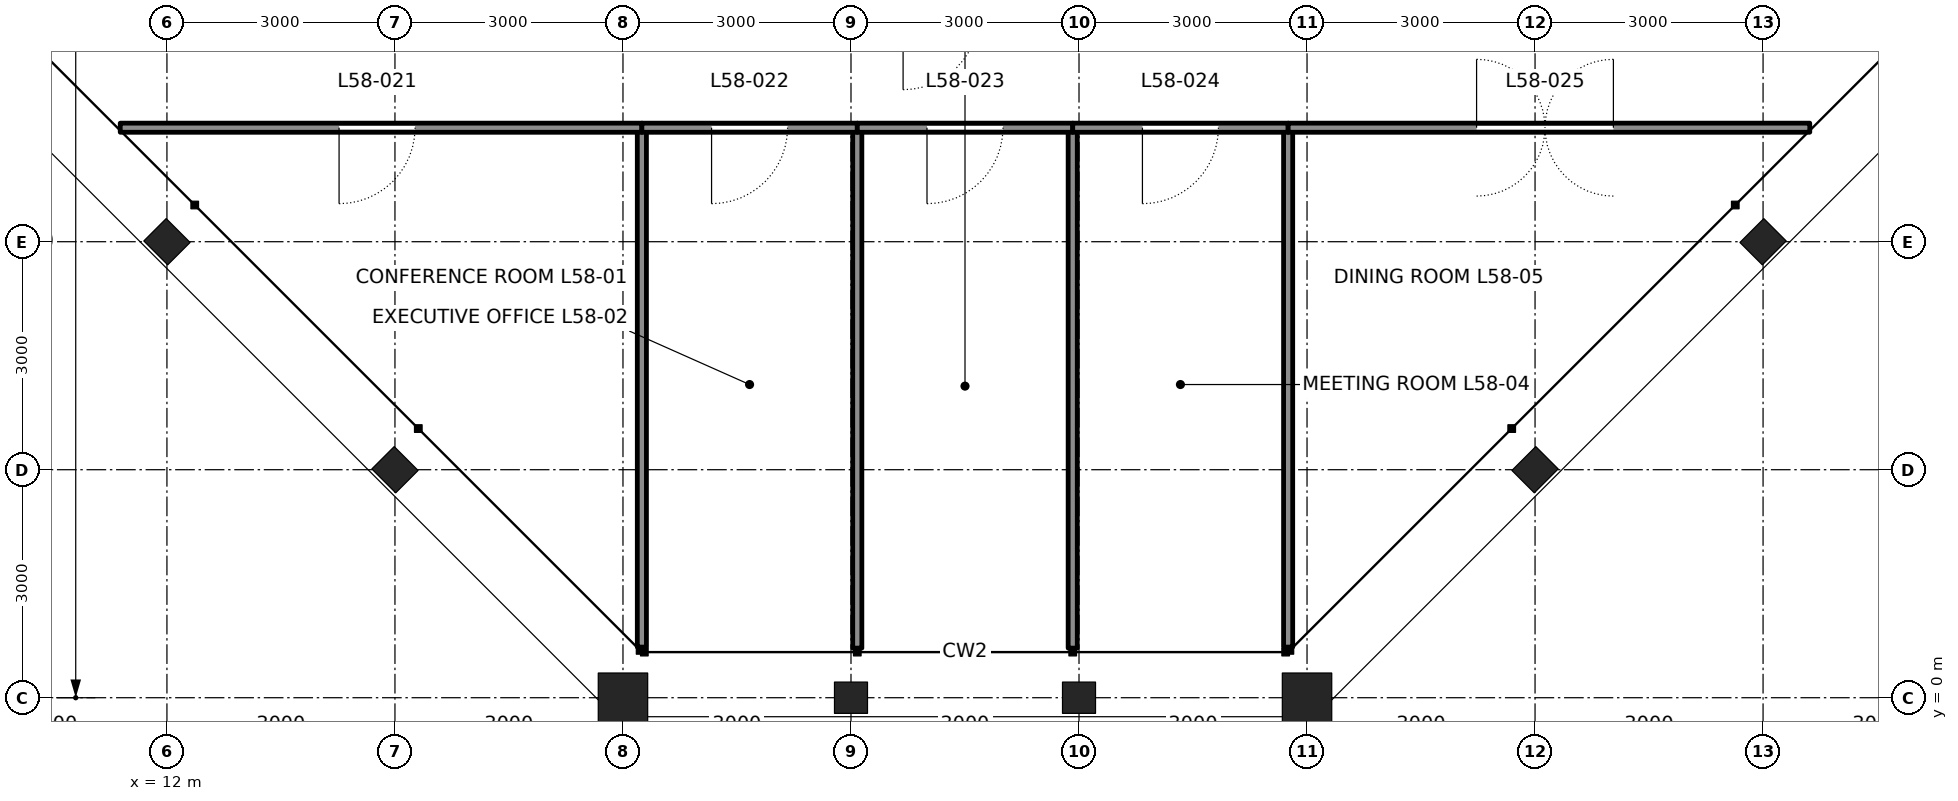
"""IFC4 building model, lengths in metres.
Left out: names, types, materials, properties, quantities, classifications, styles, units other than length and angle.
Written with IfcOpenShell. Run it as: python <this file> out.ifc"""

import sys

from ifc_helpers import new_model, si_unit, direction, frame, frame_2d, origin, origin_2d, place, context, subcontext, project, spatial, rectangle, hollow_rectangle, i_section, extrude, element, fill, save


model = new_model("IFC4")
c1 = context("Model", 3, precision=1e-05, world=origin(), true_north=direction((0.0, 1.0)))
c2 = subcontext(c1, "Body", "Model", "MODEL_VIEW")
j1 = project(units=[si_unit("LENGTHUNIT", "METRE"), si_unit("PLANEANGLEUNIT", "RADIAN")], contexts=[c1])
p1 = place(None, origin())
s1 = spatial("IfcSite", under=j1, at=p1, CompositionType="ELEMENT")
p2 = place(p1, origin())
s2 = spatial("IfcBuilding", under=s1, at=p2, CompositionType="ELEMENT")
p3 = place(p2, frame((0.0, 0.0, 262.2)))
s3 = spatial("IfcBuildingStorey", under=s2, at=p3, CompositionType="ELEMENT", Elevation=262.2)
p4 = place(p3, frame((18.0, 0.0, 0.0), z_axis=(0.0, 0.0, 1.0), x_axis=(0.0, -1.0, 0.0)))
e1 = element("IfcColumn", 1, at=p4, inside=s3, PredefinedType="COLUMN", context=c2, shape_type="SweptSolid", body=[
    extrude(hollow_rectangle(XDim=0.65, YDim=0.65, WallThickness=0.065, at=origin_2d()), origin(), (0.0, 0.0, 1.0), 4.2),
])
for number, where, z_axis, x_axis in (
    (2, (21.0, 0.0, 0.0), (0.0, 0.0, 1.0), (0.0, -1.0, 0.0)),
    (3, (24.0, 0.0, 0.0), (0.0, 0.0, 1.0), (0.0, -1.0, 0.0)),
):
    element("IfcColumn", number, at=place(p3, frame(where, z_axis=z_axis, x_axis=x_axis)), inside=s3, PredefinedType="COLUMN", context=c2, shape_type="SweptSolid", body=[
        extrude(i_section(OverallWidth=0.411, OverallDepth=0.434, WebThickness=0.036, FlangeThickness=0.057, at=origin_2d()), origin(), (0.0, 0.0, 1.0), 4.2),
    ])
p5 = place(p3, frame((27.0, 0.0, 0.0), z_axis=(0.0, 0.0, 1.0), x_axis=(0.0, -1.0, 0.0)))
e4 = element("IfcColumn", 4, at=p5, inside=s3, PredefinedType="COLUMN", context=c2, shape_type="SweptSolid", body=[
    extrude(hollow_rectangle(XDim=0.65, YDim=0.65, WallThickness=0.065, at=origin_2d()), origin(), (0.0, 0.0, 1.0), 4.2),
])
for number, where, z_axis, x_axis in (
    (5, (30.0, 3.0, 0.0), (0.0, 0.0, 1.0), (0.707, -0.707, 0.0)),
    (6, (33.0, 6.0, 0.0), (0.0, 0.0, 1.0), (0.707, -0.707, 0.0)),
    (7, (12.0, 6.0, 0.0), (0.0, 0.0, 1.0), (-0.707, -0.707, 0.0)),
    (8, (15.0, 3.0, 0.0), (0.0, 0.0, 1.0), (-0.707, -0.707, 0.0)),
):
    element("IfcColumn", number, at=place(p3, frame(where, z_axis=z_axis, x_axis=x_axis)), inside=s3, PredefinedType="COLUMN", context=c2, shape_type="SweptSolid", body=[
        extrude(i_section(OverallWidth=0.417, OverallDepth=0.445, WebThickness=0.039, FlangeThickness=0.063, at=origin_2d()), origin(), (0.0, 0.0, 1.0), 4.2),
    ])
p6 = place(p3, frame((18.249, 0.666, 0.0), z_axis=(0.0, 0.0, 1.0), x_axis=(0.0, 1.0, 0.0)))
e9 = element("IfcWall", 9, at=p6, inside=s3, PredefinedType="PARTITIONING", context=c2, shape_type="SweptSolid", body=[
    extrude(rectangle(XDim=6.834, YDim=0.12, at=frame_2d((3.417, 0.0))), origin(), (0.0, 0.0, 1.0), 4.04),
])
for number, where, z_axis, x_axis in (
    (10, (21.083, 0.653, 0.0), (0.0, 0.0, 1.0), (0.0, 1.0, 0.0)),
    (11, (23.917, 0.653, 0.0), (0.0, 0.0, 1.0), (0.0, 1.0, 0.0)),
):
    element("IfcWall", number, at=place(p3, frame(where, z_axis=z_axis, x_axis=x_axis)), inside=s3, PredefinedType="PARTITIONING", context=c2, shape_type="SweptSolid", body=[
        extrude(rectangle(XDim=6.847, YDim=0.12, at=frame_2d((3.424, 0.0))), origin(), (0.0, 0.0, 1.0), 3.357),
    ])
p7 = place(p3, frame((26.751, 0.666, 0.0), z_axis=(0.0, 0.0, 1.0), x_axis=(0.0, 1.0, 0.0)))
e12 = element("IfcWall", 12, at=p7, inside=s3, PredefinedType="PARTITIONING", context=c2, shape_type="SweptSolid", body=[
    extrude(rectangle(XDim=6.834, YDim=0.12, at=frame_2d((3.417, 0.0))), origin(), (0.0, 0.0, 1.0), 4.04),
])
p8 = place(p3, frame((11.385, 7.5, 0.0), z_axis=(0.0, 0.0, 1.0), x_axis=(1.0, 0.0, 0.0)))
e13 = element("IfcWall", 13, at=p8, inside=s3, PredefinedType="PARTITIONING", context=c2, shape_type="SweptSolid", body=[
    extrude(rectangle(XDim=6.863, YDim=0.12, at=frame_2d((3.432, 0.0))), origin(), (0.0, 0.0, 1.0), 4.04),
])
p9 = place(p8, frame((2.879, 0.0, 0.0)))
e14 = element("IfcOpeningElement", 14, at=p9, cuts=e13, PredefinedType="OPENING", context=c2, shape_type="SweptSolid", body=[
    extrude(rectangle(XDim=1.0, YDim=2.4, at=frame_2d((0.5, 1.2))), frame((0.0, 0.07, 0.0), z_axis=(0.0, -1.0, 0.0), x_axis=(1.0, 0.0, 0.0)), (0.0, 0.0, 1.0), 0.14),
])
p10 = place(p3, frame((18.249, 7.5, 0.0), z_axis=(0.0, 0.0, 1.0), x_axis=(1.0, 0.0, 0.0)))
e15 = element("IfcWall", 15, at=p10, inside=s3, PredefinedType="PARTITIONING", context=c2, shape_type="SweptSolid", body=[
    extrude(rectangle(XDim=2.834, YDim=0.12, at=frame_2d((1.417, 0.0))), origin(), (0.0, 0.0, 1.0), 4.04),
])
p11 = place(p10, frame((0.917, 0.0, 0.0)))
e16 = element("IfcOpeningElement", 16, at=p11, cuts=e15, PredefinedType="OPENING", context=c2, shape_type="SweptSolid", body=[
    extrude(rectangle(XDim=1.0, YDim=2.4, at=frame_2d((0.5, 1.2))), frame((0.0, 0.07, 0.0), z_axis=(0.0, -1.0, 0.0), x_axis=(1.0, 0.0, 0.0)), (0.0, 0.0, 1.0), 0.14),
])
p12 = place(p3, frame((21.083, 7.5, 0.0), z_axis=(0.0, 0.0, 1.0), x_axis=(1.0, 0.0, 0.0)))
e17 = element("IfcWall", 17, at=p12, inside=s3, PredefinedType="PARTITIONING", context=c2, shape_type="SweptSolid", body=[
    extrude(rectangle(XDim=2.834, YDim=0.12, at=frame_2d((1.417, 0.0))), origin(), (0.0, 0.0, 1.0), 4.04),
])
p13 = place(p12, frame((0.917, 0.0, 0.0)))
e18 = element("IfcOpeningElement", 18, at=p13, cuts=e17, PredefinedType="OPENING", context=c2, shape_type="SweptSolid", body=[
    extrude(rectangle(XDim=1.0, YDim=2.4, at=frame_2d((0.5, 1.2))), frame((0.0, 0.07, 0.0), z_axis=(0.0, -1.0, 0.0), x_axis=(1.0, 0.0, 0.0)), (0.0, 0.0, 1.0), 0.14),
])
p14 = place(p3, frame((23.917, 7.5, 0.0), z_axis=(0.0, 0.0, 1.0), x_axis=(1.0, 0.0, 0.0)))
e19 = element("IfcWall", 19, at=p14, inside=s3, PredefinedType="PARTITIONING", context=c2, shape_type="SweptSolid", body=[
    extrude(rectangle(XDim=2.834, YDim=0.12, at=frame_2d((1.417, 0.0))), origin(), (0.0, 0.0, 1.0), 4.04),
])
p15 = place(p14, frame((0.917, 0.0, 0.0)))
e20 = element("IfcOpeningElement", 20, at=p15, cuts=e19, PredefinedType="OPENING", context=c2, shape_type="SweptSolid", body=[
    extrude(rectangle(XDim=1.0, YDim=2.4, at=frame_2d((0.5, 1.2))), frame((0.0, 0.07, 0.0), z_axis=(0.0, -1.0, 0.0), x_axis=(1.0, 0.0, 0.0)), (0.0, 0.0, 1.0), 0.14),
])
p16 = place(p3, frame((26.751, 7.5, 0.0), z_axis=(0.0, 0.0, 1.0), x_axis=(1.0, 0.0, 0.0)))
e21 = element("IfcWall", 21, at=p16, inside=s3, PredefinedType="PARTITIONING", context=c2, shape_type="SweptSolid", body=[
    extrude(rectangle(XDim=6.863, YDim=0.12, at=frame_2d((3.432, 0.0))), origin(), (0.0, 0.0, 1.0), 4.04),
])
p17 = place(p16, frame((2.479, 0.0, 0.0)))
e22 = element("IfcOpeningElement", 22, at=p17, cuts=e21, PredefinedType="OPENING", context=c2, shape_type="SweptSolid", body=[
    extrude(rectangle(XDim=1.8, YDim=2.4, at=frame_2d((0.9, 1.2))), frame((0.0, 0.07, 0.0), z_axis=(0.0, -1.0, 0.0), x_axis=(1.0, 0.0, 0.0)), (0.0, 0.0, 1.0), 0.14),
])
p18 = place(p9, frame((1.0, 0.0, 0.0), z_axis=(0.0, 0.0, 1.0), x_axis=(-1.0, 0.0, 0.0)))
e23 = element("IfcDoor", 23, at=p18, inside=s3, OperationType="SINGLE_SWING_RIGHT", PredefinedType="DOOR", context=c2, shape_type="SweptSolid", body=[
    extrude(rectangle(XDim=1.0, YDim=2.4, at=frame_2d((0.5, 1.2))), frame((0.0, 0.025, 0.0), z_axis=(0.0, -1.0, 0.0), x_axis=(1.0, 0.0, 0.0)), (0.0, 0.0, 1.0), 0.05),
])
fill(e14, e23)
p19 = place(p11, frame((1.0, 0.0, 0.0), z_axis=(0.0, 0.0, 1.0), x_axis=(-1.0, 0.0, 0.0)))
e24 = element("IfcDoor", 24, at=p19, inside=s3, OperationType="SINGLE_SWING_RIGHT", PredefinedType="DOOR", context=c2, shape_type="SweptSolid", body=[
    extrude(rectangle(XDim=1.0, YDim=2.4, at=frame_2d((0.5, 1.2))), frame((0.0, 0.025, 0.0), z_axis=(0.0, -1.0, 0.0), x_axis=(1.0, 0.0, 0.0)), (0.0, 0.0, 1.0), 0.05),
])
fill(e16, e24)
p20 = place(p13, frame((1.0, 0.0, 0.0), z_axis=(0.0, 0.0, 1.0), x_axis=(-1.0, 0.0, 0.0)))
e25 = element("IfcDoor", 25, at=p20, inside=s3, OperationType="SINGLE_SWING_RIGHT", PredefinedType="DOOR", context=c2, shape_type="SweptSolid", body=[
    extrude(rectangle(XDim=1.0, YDim=2.4, at=frame_2d((0.5, 1.2))), frame((0.0, 0.025, 0.0), z_axis=(0.0, -1.0, 0.0), x_axis=(1.0, 0.0, 0.0)), (0.0, 0.0, 1.0), 0.05),
])
fill(e18, e25)
p21 = place(p15, frame((1.0, 0.0, 0.0), z_axis=(0.0, 0.0, 1.0), x_axis=(-1.0, 0.0, 0.0)))
e26 = element("IfcDoor", 26, at=p21, inside=s3, OperationType="SINGLE_SWING_RIGHT", PredefinedType="DOOR", context=c2, shape_type="SweptSolid", body=[
    extrude(rectangle(XDim=1.0, YDim=2.4, at=frame_2d((0.5, 1.2))), frame((0.0, 0.025, 0.0), z_axis=(0.0, -1.0, 0.0), x_axis=(1.0, 0.0, 0.0)), (0.0, 0.0, 1.0), 0.05),
])
fill(e20, e26)
p22 = place(p17, origin())
e27 = element("IfcDoor", 27, at=p22, inside=s3, OperationType="DOUBLE_DOOR_DOUBLE_SWING", PredefinedType="DOOR", context=c2, shape_type="SweptSolid", body=[
    extrude(rectangle(XDim=1.8, YDim=2.4, at=frame_2d((0.9, 1.2))), frame((0.0, 0.025, 0.0), z_axis=(0.0, -1.0, 0.0), x_axis=(1.0, 0.0, 0.0)), (0.0, 0.0, 1.0), 0.05),
])
fill(e22, e27)
save(model, sys.argv[1])
